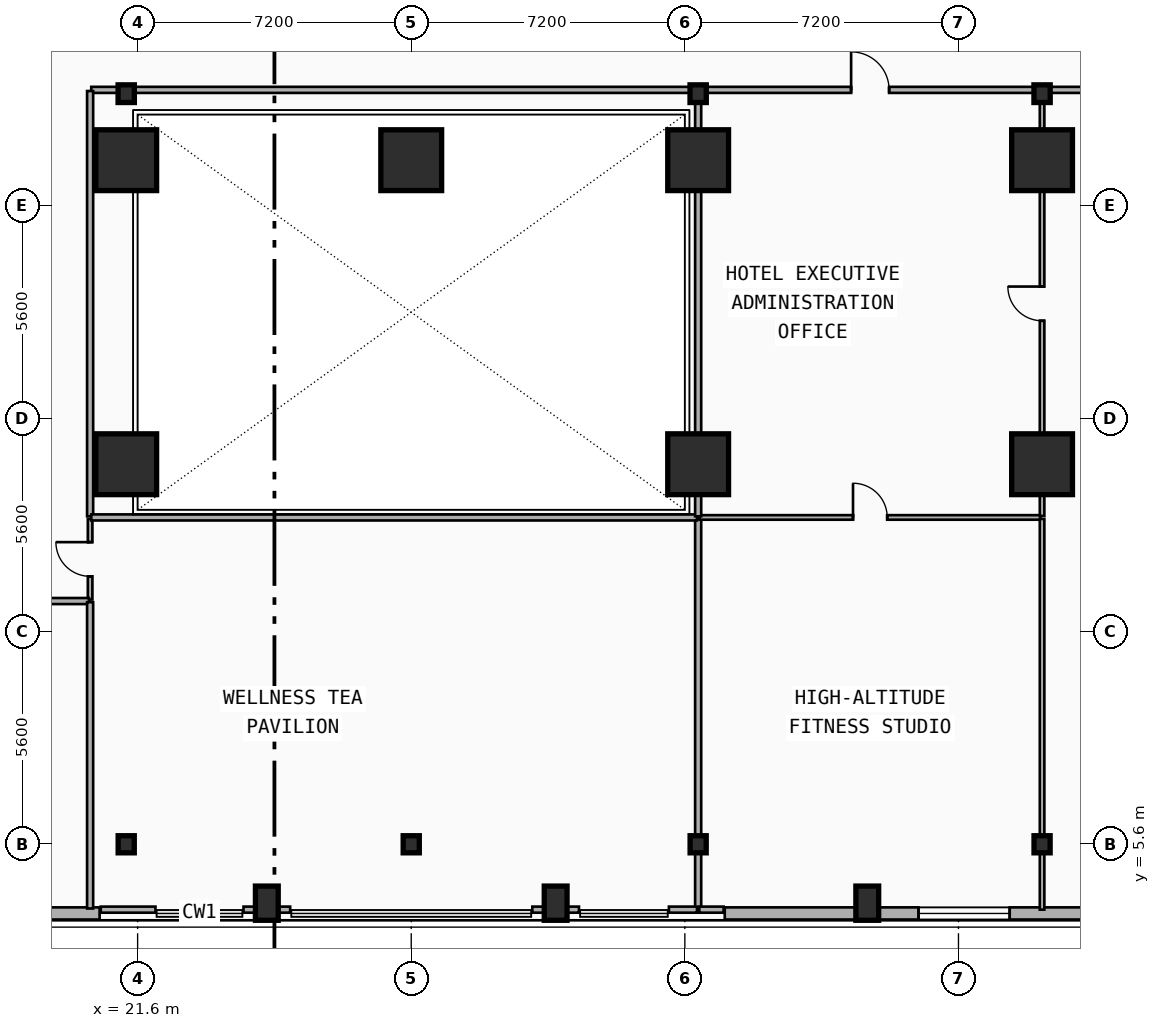
"""IFC4 building model, lengths in metres.
Left out: names, types, materials, properties, quantities, classifications, styles, units other than length and angle.
Written with IfcOpenShell. Run it as: python <this file> out.ifc"""

import sys

from ifc_helpers import new_model, si_unit, direction, frame, frame_2d, origin, origin_2d, place, context, subcontext, project, spatial, rectangle, i_section, extrude, element, fill, save


model = new_model("IFC4")
c1 = context("Model", 3, precision=1e-05, world=origin(), true_north=direction((0.0, 1.0)))
c2 = subcontext(c1, "Body", "Model", "MODEL_VIEW")
j1 = project(units=[si_unit("LENGTHUNIT", "METRE"), si_unit("PLANEANGLEUNIT", "RADIAN")], contexts=[c1])
p1 = place(None, origin())
s1 = spatial("IfcSite", under=j1, at=p1, CompositionType="ELEMENT")
p2 = place(p1, origin())
s2 = spatial("IfcBuilding", under=s1, at=p2, CompositionType="ELEMENT")
p3 = place(p2, frame((0.0, 0.0, 24.2)))
s3 = spatial("IfcBuildingStorey", under=s2, at=p3, CompositionType="ELEMENT", Elevation=24.2)
for number, where, z_axis, x_axis in (
    (1, (21.3, 25.35, 0.0), (0.0, 0.0, 1.0), (1.0, 0.0, 0.0)),
    (2, (36.35, 25.35, 0.0), (0.0, 0.0, 1.0), (1.0, 0.0, 0.0)),
    (3, (45.4, 25.35, 0.0), (0.0, 0.0, 1.0), (1.0, 0.0, 0.0)),
):
    element("IfcColumn", number, at=place(p3, frame(where, z_axis=z_axis, x_axis=x_axis)), inside=s3, PredefinedType="COLUMN", context=c2, shape_type="SweptSolid", body=[
        extrude(i_section(OverallWidth=0.428, OverallDepth=0.465, WebThickness=0.045, FlangeThickness=0.073, FilletRadius=0.015, at=origin_2d()), origin(), (0.0, 0.0, 1.0), 4.8),
    ])
p4 = place(p3, frame((21.3, 5.6, 0.0), z_axis=(0.0, 0.0, 1.0), x_axis=(1.0, 0.0, 0.0)))
e4 = element("IfcColumn", 4, at=p4, inside=s3, PredefinedType="COLUMN", context=c2, shape_type="SweptSolid", body=[
    extrude(i_section(OverallWidth=0.424, OverallDepth=0.45, WebThickness=0.041, FlangeThickness=0.065, FilletRadius=0.015, at=origin_2d()), origin(), (0.0, 0.0, 1.0), 4.8),
])
p5 = place(p3, frame((21.3, 15.6, 0.0), z_axis=(0.0, 0.0, 1.0), x_axis=(1.0, 0.0, 0.0)))
e5 = element("IfcColumn", 5, at=p5, inside=s3, PredefinedType="COLUMN", context=c2, shape_type="SweptSolid", body=[
    extrude(rectangle(XDim=1.6, YDim=1.6, at=origin_2d()), origin(), (0.0, 0.0, 1.0), 4.8),
])
p6 = place(p3, frame((21.3, 23.6, 0.0), z_axis=(0.0, 0.0, 1.0), x_axis=(1.0, 0.0, 0.0)))
e6 = element("IfcColumn", 6, at=p6, inside=s3, PredefinedType="COLUMN", context=c2, shape_type="SweptSolid", body=[
    extrude(rectangle(XDim=1.6, YDim=1.6, at=origin_2d()), origin(), (0.0, 0.0, 1.0), 4.732),
])
p7 = place(p3, frame((28.8, 5.6, 0.0), z_axis=(0.0, 0.0, 1.0), x_axis=(1.0, 0.0, 0.0)))
e7 = element("IfcColumn", 7, at=p7, inside=s3, PredefinedType="COLUMN", context=c2, shape_type="SweptSolid", body=[
    extrude(i_section(OverallWidth=0.424, OverallDepth=0.45, WebThickness=0.041, FlangeThickness=0.065, FilletRadius=0.015, at=origin_2d()), origin(), (0.0, 0.0, 1.0), 4.8),
])
p8 = place(p3, frame((28.8, 23.6, 0.0), z_axis=(0.0, 0.0, 1.0), x_axis=(1.0, 0.0, 0.0)))
e8 = element("IfcColumn", 8, at=p8, inside=s3, PredefinedType="COLUMN", context=c2, shape_type="SweptSolid", body=[
    extrude(rectangle(XDim=1.6, YDim=1.6, at=origin_2d()), origin(), (0.0, 0.0, 1.0), 4.732),
])
p9 = place(p3, frame((36.35, 5.6, 0.0), z_axis=(0.0, 0.0, 1.0), x_axis=(1.0, 0.0, 0.0)))
e9 = element("IfcColumn", 9, at=p9, inside=s3, PredefinedType="COLUMN", context=c2, shape_type="SweptSolid", body=[
    extrude(i_section(OverallWidth=0.424, OverallDepth=0.45, WebThickness=0.041, FlangeThickness=0.065, FilletRadius=0.015, at=origin_2d()), origin(), (0.0, 0.0, 1.0), 4.8),
])
p10 = place(p3, frame((36.35, 15.6, 0.0), z_axis=(0.0, 0.0, 1.0), x_axis=(1.0, 0.0, 0.0)))
e10 = element("IfcColumn", 10, at=p10, inside=s3, PredefinedType="COLUMN", context=c2, shape_type="SweptSolid", body=[
    extrude(rectangle(XDim=1.6, YDim=1.6, at=origin_2d()), origin(), (0.0, 0.0, 1.0), 4.8),
])
p11 = place(p3, frame((36.35, 23.6, 0.0), z_axis=(0.0, 0.0, 1.0), x_axis=(1.0, 0.0, 0.0)))
e11 = element("IfcColumn", 11, at=p11, inside=s3, PredefinedType="COLUMN", context=c2, shape_type="SweptSolid", body=[
    extrude(rectangle(XDim=1.6, YDim=1.6, at=origin_2d()), origin(), (0.0, 0.0, 1.0), 4.732),
])
p12 = place(p3, frame((45.4, 5.6, 0.0), z_axis=(0.0, 0.0, 1.0), x_axis=(1.0, 0.0, 0.0)))
e12 = element("IfcColumn", 12, at=p12, inside=s3, PredefinedType="COLUMN", context=c2, shape_type="SweptSolid", body=[
    extrude(i_section(OverallWidth=0.424, OverallDepth=0.45, WebThickness=0.041, FlangeThickness=0.065, FilletRadius=0.015, at=origin_2d()), origin(), (0.0, 0.0, 1.0), 4.8),
])
p13 = place(p3, frame((45.4, 15.6, 0.0), z_axis=(0.0, 0.0, 1.0), x_axis=(1.0, 0.0, 0.0)))
e13 = element("IfcColumn", 13, at=p13, inside=s3, PredefinedType="COLUMN", context=c2, shape_type="SweptSolid", body=[
    extrude(rectangle(XDim=1.6, YDim=1.6, at=origin_2d()), origin(), (0.0, 0.0, 1.0), 4.8),
])
p14 = place(p3, frame((45.4, 23.6, 0.0), z_axis=(0.0, 0.0, 1.0), x_axis=(1.0, 0.0, 0.0)))
e14 = element("IfcColumn", 14, at=p14, inside=s3, PredefinedType="COLUMN", context=c2, shape_type="SweptSolid", body=[
    extrude(rectangle(XDim=1.6, YDim=1.6, at=origin_2d()), origin(), (0.0, 0.0, 1.0), 4.732),
])
for number, where, z_axis, x_axis in (
    (15, (25.0, 4.05, 0.0), (0.0, 0.0, 1.0), (1.0, 0.0, 0.0)),
    (16, (32.6, 4.05, 0.0), (0.0, 0.0, 1.0), (1.0, 0.0, 0.0)),
    (17, (40.8, 4.05, 0.0), (0.0, 0.0, 1.0), (1.0, 0.0, 0.0)),
):
    element("IfcColumn", number, at=place(p3, frame(where, z_axis=z_axis, x_axis=x_axis)), inside=s3, PredefinedType="PILASTER", context=c2, shape_type="SweptSolid", body=[
        extrude(rectangle(XDim=0.6, YDim=0.9, at=origin_2d()), origin(), (0.0, 0.0, 1.0), 4.8),
    ])
p15 = place(p3, frame((20.6, 3.78, 0.0), z_axis=(0.0, 0.0, 1.0), x_axis=(-1.0, 0.0, 0.0)))
e18 = element("IfcWall", 18, at=p15, inside=s3, PredefinedType="SOLIDWALL", context=c2, shape_type="SweptSolid", body=[
    extrude(rectangle(XDim=17.0, YDim=0.32, at=frame_2d((8.5, 0.0))), origin(), (0.0, 0.0, 1.0), 4.48),
])
p16 = place(p15, frame((6.5, 0.0, 0.9)))
e19 = element("IfcOpeningElement", 19, at=p16, cuts=e18, PredefinedType="OPENING", context=c2, shape_type="SweptSolid", body=[
    extrude(rectangle(XDim=2.4, YDim=1.8, at=frame_2d((1.2, 0.9))), frame((0.0, 0.17, 0.0), z_axis=(0.0, -1.0, 0.0), x_axis=(1.0, 0.0, 0.0)), (0.0, 0.0, 1.0), 0.34),
])
p17 = place(p3, frame((54.0, 3.78, 0.0), z_axis=(0.0, 0.0, 1.0), x_axis=(-1.0, 0.0, 0.0)))
e20 = element("IfcWall", 20, at=p17, inside=s3, PredefinedType="SOLIDWALL", context=c2, shape_type="SweptSolid", body=[
    extrude(rectangle(XDim=16.95, YDim=0.32, at=frame_2d((8.475, 0.0))), origin(), (0.0, 0.0, 1.0), 4.48),
])
p18 = place(p17, frame((9.452, 0.0, 0.9)))
e21 = element("IfcOpeningElement", 21, at=p18, cuts=e20, PredefinedType="OPENING", context=c2, shape_type="SweptSolid", body=[
    extrude(rectangle(XDim=2.4, YDim=1.8, at=frame_2d((1.2, 0.9))), frame((0.0, 0.17, 0.0), z_axis=(0.0, -1.0, 0.0), x_axis=(1.0, 0.0, 0.0)), (0.0, 0.0, 1.0), 0.34),
])
p19 = place(p17, frame((1.262, 0.0, 0.9)))
e22 = element("IfcOpeningElement", 22, at=p19, cuts=e20, PredefinedType="OPENING", context=c2, shape_type="SweptSolid", body=[
    extrude(rectangle(XDim=2.4, YDim=1.8, at=frame_2d((1.2, 0.9))), frame((0.0, 0.17, 0.0), z_axis=(0.0, -1.0, 0.0), x_axis=(1.0, 0.0, 0.0)), (0.0, 0.0, 1.0), 0.34),
])
p20 = place(p3, frame((36.39, 25.45, 0.0), z_axis=(0.0, 0.0, 1.0), x_axis=(1.0, 0.0, 0.0)))
e23 = element("IfcWall", 23, at=p20, inside=s3, PredefinedType="PARTITIONING", context=c2, shape_type="SweptSolid", body=[
    extrude(rectangle(XDim=8.97, YDim=0.16, at=frame_2d((4.485, 0.0))), origin(), (0.0, 0.0, 1.0), 3.452),
])
p21 = place(p20, frame((3.985, 0.0, 0.0)))
e24 = element("IfcOpeningElement", 24, at=p21, cuts=e23, PredefinedType="OPENING", context=c2, shape_type="SweptSolid", body=[
    extrude(rectangle(XDim=1.0, YDim=2.15, at=frame_2d((0.5, 1.075))), frame((0.0, 0.09, 0.0), z_axis=(0.0, -1.0, 0.0), x_axis=(1.0, 0.0, 0.0)), (0.0, 0.0, 1.0), 0.18),
])
p22 = place(p3, frame((45.44, 25.45, 0.0), z_axis=(0.0, 0.0, 1.0), x_axis=(1.0, 0.0, 0.0)))
e25 = element("IfcWall", 25, at=p22, inside=s3, PredefinedType="PARTITIONING", context=c2, shape_type="SweptSolid", body=[
    extrude(rectangle(XDim=2.57, YDim=0.16, at=frame_2d((1.285, 0.0))), origin(), (0.0, 0.0, 1.0), 3.452),
])
p23 = place(p3, frame((20.35, 12.04, 0.0), z_axis=(0.0, 0.0, 1.0), x_axis=(0.0, 1.0, 0.0)))
e26 = element("IfcWall", 26, at=p23, inside=s3, PredefinedType="PARTITIONING", context=c2, shape_type="SweptSolid", body=[
    extrude(rectangle(XDim=2.12, YDim=0.12, at=frame_2d((1.06, 0.0))), origin(), (0.0, 0.0, 1.0), 4.1),
])
p24 = place(p23, frame((0.61, 0.0, 0.0)))
e27 = element("IfcOpeningElement", 27, at=p24, cuts=e26, PredefinedType="OPENING", context=c2, shape_type="SweptSolid", body=[
    extrude(rectangle(XDim=0.9, YDim=2.1, at=frame_2d((0.45, 1.05))), frame((0.0, 0.07, 0.0), z_axis=(0.0, -1.0, 0.0), x_axis=(1.0, 0.0, 0.0)), (0.0, 0.0, 1.0), 0.14),
])
p25 = place(p3, frame((36.35, 3.88, 0.0), z_axis=(0.0, 0.0, 1.0), x_axis=(0.0, 1.0, 0.0)))
e28 = element("IfcWall", 28, at=p25, inside=s3, PredefinedType="PARTITIONING", context=c2, shape_type="SweptSolid", body=[
    extrude(rectangle(XDim=10.28, YDim=0.16, at=frame_2d((5.14, 0.0))), origin(), (0.0, 0.0, 1.0), 3.452),
])
p26 = place(p3, frame((36.39, 14.2, 0.0), z_axis=(0.0, 0.0, 1.0), x_axis=(1.0, 0.0, 0.0)))
e29 = element("IfcWall", 29, at=p26, inside=s3, PredefinedType="PARTITIONING", context=c2, shape_type="SweptSolid", body=[
    extrude(rectangle(XDim=8.97, YDim=0.12, at=frame_2d((4.485, 0.0))), origin(), (0.0, 0.0, 1.0), 3.452),
])
p27 = place(p26, frame((4.035, 0.0, 0.0)))
e30 = element("IfcOpeningElement", 30, at=p27, cuts=e29, PredefinedType="OPENING", context=c2, shape_type="SweptSolid", body=[
    extrude(rectangle(XDim=0.9, YDim=2.1, at=frame_2d((0.45, 1.05))), frame((0.0, 0.07, 0.0), z_axis=(0.0, -1.0, 0.0), x_axis=(1.0, 0.0, 0.0)), (0.0, 0.0, 1.0), 0.14),
])
p28 = place(p3, frame((45.4, 3.88, 0.0), z_axis=(0.0, 0.0, 1.0), x_axis=(0.0, 1.0, 0.0)))
e31 = element("IfcWall", 31, at=p28, inside=s3, PredefinedType="PARTITIONING", context=c2, shape_type="SweptSolid", body=[
    extrude(rectangle(XDim=10.28, YDim=0.12, at=frame_2d((5.14, 0.0))), origin(), (0.0, 0.0, 1.0), 3.452),
])
p29 = place(p3, frame((45.4, 14.24, 0.0), z_axis=(0.0, 0.0, 1.0), x_axis=(0.0, 1.0, 0.0)))
e32 = element("IfcWall", 32, at=p29, inside=s3, PredefinedType="PARTITIONING", context=c2, shape_type="SweptSolid", body=[
    extrude(rectangle(XDim=11.17, YDim=0.12, at=frame_2d((5.585, 0.0))), origin(), (0.0, 0.0, 1.0), 3.452),
])
p30 = place(p29, frame((5.135, 0.0, 0.0)))
e33 = element("IfcOpeningElement", 33, at=p30, cuts=e32, PredefinedType="OPENING", context=c2, shape_type="SweptSolid", body=[
    extrude(rectangle(XDim=0.9, YDim=2.1, at=frame_2d((0.45, 1.05))), frame((0.0, 0.07, 0.0), z_axis=(0.0, -1.0, 0.0), x_axis=(1.0, 0.0, 0.0)), (0.0, 0.0, 1.0), 0.14),
])
p31 = place(p3, frame((20.38, 25.45, 0.0), z_axis=(0.0, 0.0, 1.0), x_axis=(1.0, 0.0, 0.0)))
e34 = element("IfcWall", 34, at=p31, inside=s3, PredefinedType="PARTITIONING", context=c2, shape_type="SweptSolid", body=[
    extrude(rectangle(XDim=15.94, YDim=0.16, at=frame_2d((7.97, 0.0))), origin(), (0.0, 0.0, 1.0), 3.452),
])
p32 = place(p3, frame((18.83, 12.0, 0.0), z_axis=(0.0, 0.0, 1.0), x_axis=(1.0, 0.0, 0.0)))
e35 = element("IfcWall", 35, at=p32, inside=s3, PredefinedType="PARTITIONING", context=c2, shape_type="SweptSolid", body=[
    extrude(rectangle(XDim=1.49, YDim=0.16, at=frame_2d((0.745, 0.0))), origin(), (0.0, 0.0, 1.0), 4.1),
])
p33 = place(p3, frame((20.35, 14.23, 0.0), z_axis=(0.0, 0.0, 1.0), x_axis=(0.0, 1.0, 0.0)))
e36 = element("IfcWall", 36, at=p33, inside=s3, PredefinedType="PARTITIONING", context=c2, shape_type="SweptSolid", body=[
    extrude(rectangle(XDim=11.19, YDim=0.16, at=frame_2d((5.595, 0.0))), origin(), (0.0, 0.0, 1.0), 3.452),
])
p34 = place(p3, frame((20.63, 3.88, 0.0), z_axis=(0.0, 0.0, 1.0), x_axis=(1.0, 0.0, 0.0)))
e37 = element("IfcWall", 37, at=p34, inside=s3, PredefinedType="PARTITIONING", context=c2, shape_type="SweptSolid", body=[
    extrude(rectangle(XDim=1.44, YDim=0.16, at=frame_2d((0.72, 0.0))), origin(), (0.0, 0.0, 1.0), 4.48),
])
for number, where, z_axis, x_axis in (
    (38, (24.386, 3.88, 0.0), (0.0, 0.0, 1.0), (1.0, 0.0, 0.0)),
    (39, (31.986, 3.88, 0.0), (0.0, 0.0, 1.0), (1.0, 0.0, 0.0)),
):
    element("IfcWall", number, at=place(p3, frame(where, z_axis=z_axis, x_axis=x_axis)), inside=s3, PredefinedType="PARTITIONING", context=c2, shape_type="SweptSolid", body=[
        extrude(rectangle(XDim=1.228, YDim=0.16, at=frame_2d((0.614, 0.0))), origin(), (0.0, 0.0, 1.0), 4.48),
    ])
p35 = place(p3, frame((35.58, 3.88, 0.0), z_axis=(0.0, 0.0, 1.0), x_axis=(1.0, 0.0, 0.0)))
e40 = element("IfcWall", 40, at=p35, inside=s3, PredefinedType="PARTITIONING", context=c2, shape_type="SweptSolid", body=[
    extrude(rectangle(XDim=0.74, YDim=0.16, at=frame_2d((0.37, 0.0))), origin(), (0.0, 0.0, 1.0), 4.48),
])
p36 = place(p3, frame((20.38, 14.2, 0.0), z_axis=(0.0, 0.0, 1.0), x_axis=(1.0, 0.0, 0.0)))
e41 = element("IfcWall", 41, at=p36, inside=s3, PredefinedType="PARTITIONING", context=c2, shape_type="SweptSolid", body=[
    extrude(rectangle(XDim=15.94, YDim=0.16, at=frame_2d((7.97, 0.0))), origin(), (0.0, 0.0, 1.0), 3.452),
])
p37 = place(p3, frame((20.35, 3.91, 0.0), z_axis=(0.0, 0.0, 1.0), x_axis=(0.0, 1.0, 0.0)))
e42 = element("IfcWall", 42, at=p37, inside=s3, PredefinedType="PARTITIONING", context=c2, shape_type="SweptSolid", body=[
    extrude(rectangle(XDim=8.06, YDim=0.16, at=frame_2d((4.03, 0.0))), origin(), (0.0, 0.0, 1.0), 3.81),
])
p38 = place(p3, frame((36.38, 3.88, 0.0), z_axis=(0.0, 0.0, 1.0), x_axis=(1.0, 0.0, 0.0)))
e43 = element("IfcWall", 43, at=p38, inside=s3, PredefinedType="PARTITIONING", context=c2, shape_type="SweptSolid", body=[
    extrude(rectangle(XDim=0.64, YDim=0.16, at=frame_2d((0.32, 0.0))), origin(), (0.0, 0.0, 1.0), 4.48),
])
p39 = place(p3, frame((36.35, 14.23, 0.0), z_axis=(0.0, 0.0, 1.0), x_axis=(0.0, 1.0, 0.0)))
e44 = element("IfcWall", 44, at=p39, inside=s3, PredefinedType="PARTITIONING", context=c2, shape_type="SweptSolid", body=[
    extrude(rectangle(XDim=11.19, YDim=0.16, at=frame_2d((5.595, 0.0))), origin(), (0.0, 0.0, 1.0), 3.452),
])
p40 = place(p18, origin())
e45 = element("IfcWindow", 45, at=p40, inside=s3, PartitioningType="SINGLE_PANEL", PredefinedType="WINDOW", context=c2, shape_type="SweptSolid", body=[
    extrude(rectangle(XDim=2.4, YDim=1.8, at=frame_2d((1.2, 0.9))), frame((0.0, 0.03, 0.0), z_axis=(0.0, -1.0, 0.0), x_axis=(1.0, 0.0, 0.0)), (0.0, 0.0, 1.0), 0.06),
])
fill(e21, e45)
p41 = place(p21, origin())
e46 = element("IfcDoor", 46, at=p41, inside=s3, OperationType="SINGLE_SWING_LEFT", PredefinedType="DOOR", context=c2, shape_type="SweptSolid", body=[
    extrude(rectangle(XDim=1.0, YDim=2.15, at=frame_2d((0.5, 1.075))), frame((0.0, 0.025, 0.0), z_axis=(0.0, -1.0, 0.0), x_axis=(1.0, 0.0, 0.0)), (0.0, 0.0, 1.0), 0.05),
])
fill(e24, e46)
p42 = place(p24, origin())
e47 = element("IfcDoor", 47, at=p42, inside=s3, OperationType="SINGLE_SWING_RIGHT", PredefinedType="DOOR", context=c2, shape_type="SweptSolid", body=[
    extrude(rectangle(XDim=0.9, YDim=2.1, at=frame_2d((0.45, 1.05))), frame((0.0, 0.025, 0.0), z_axis=(0.0, -1.0, 0.0), x_axis=(1.0, 0.0, 0.0)), (0.0, 0.0, 1.0), 0.05),
])
fill(e27, e47)
p43 = place(p27, origin())
e48 = element("IfcDoor", 48, at=p43, inside=s3, OperationType="SINGLE_SWING_LEFT", PredefinedType="DOOR", context=c2, shape_type="SweptSolid", body=[
    extrude(rectangle(XDim=0.9, YDim=2.1, at=frame_2d((0.45, 1.05))), frame((0.0, 0.025, 0.0), z_axis=(0.0, -1.0, 0.0), x_axis=(1.0, 0.0, 0.0)), (0.0, 0.0, 1.0), 0.05),
])
fill(e30, e48)
p44 = place(p30, origin())
e49 = element("IfcDoor", 49, at=p44, inside=s3, OperationType="SINGLE_SWING_RIGHT", PredefinedType="DOOR", context=c2, shape_type="SweptSolid", body=[
    extrude(rectangle(XDim=0.9, YDim=2.1, at=frame_2d((0.45, 1.05))), frame((0.0, 0.025, 0.0), z_axis=(0.0, -1.0, 0.0), x_axis=(1.0, 0.0, 0.0)), (0.0, 0.0, 1.0), 0.05),
])
fill(e33, e49)
save(model, sys.argv[1])
